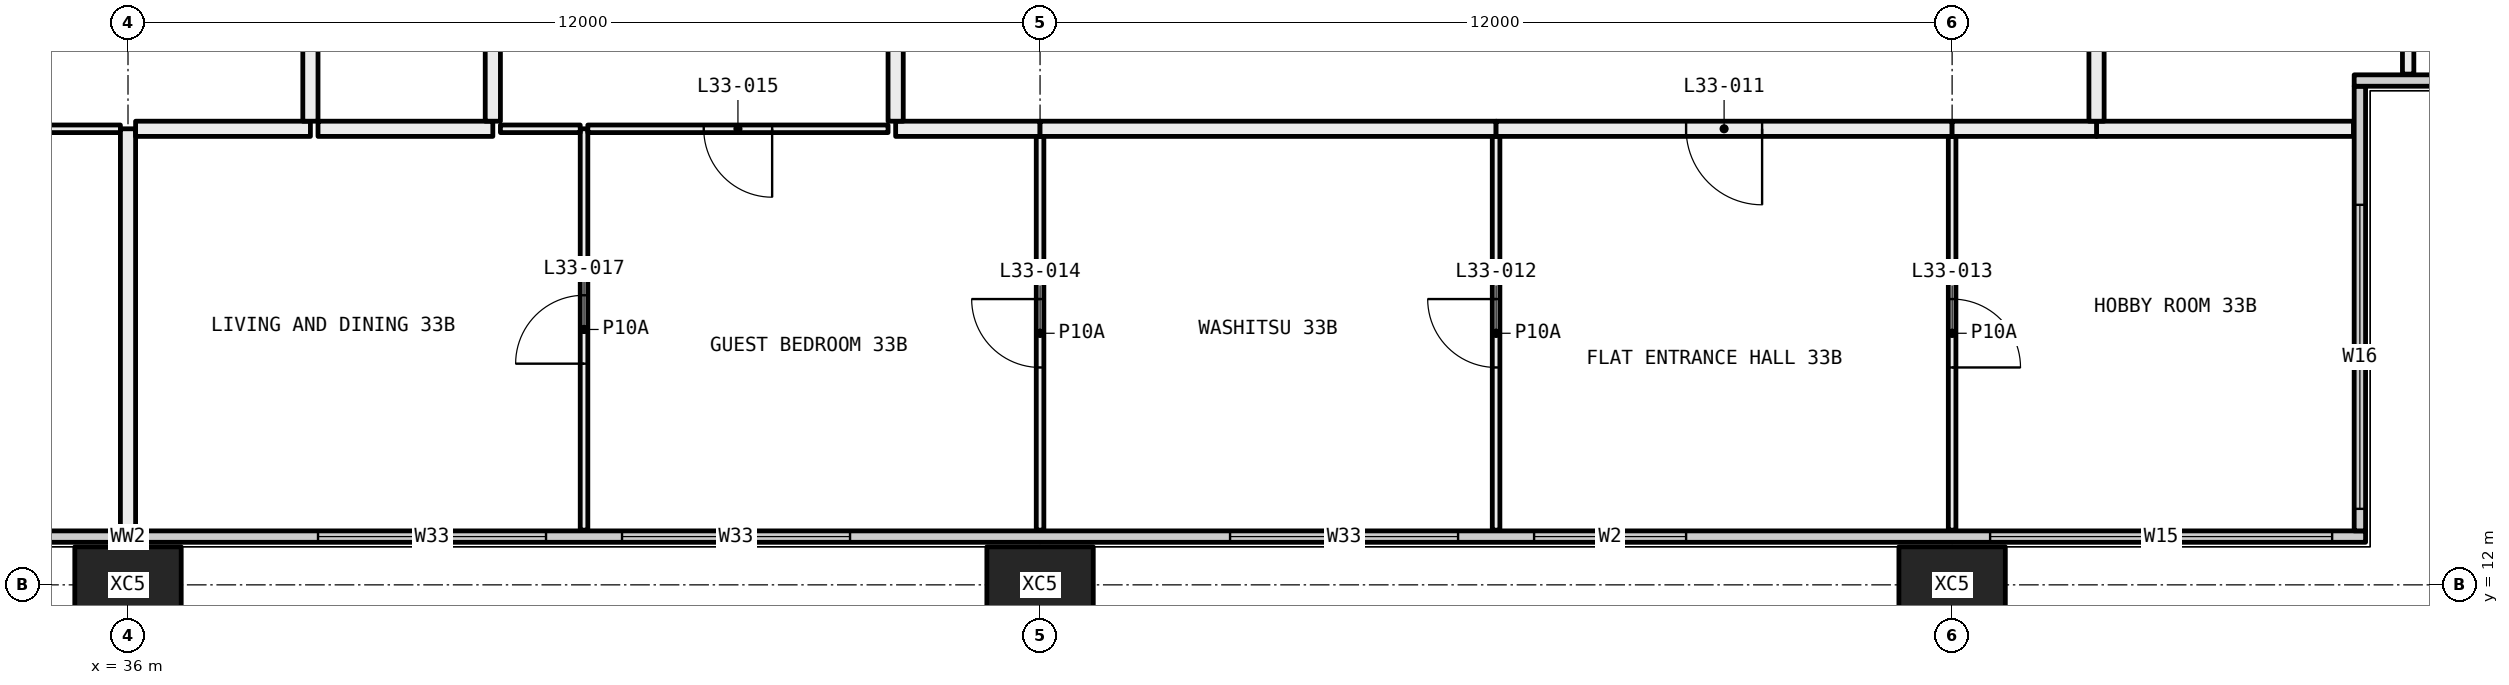
"""IFC4 building model, lengths in metres.
Left out: names, types, materials, properties, quantities, classifications, styles, units other than length and angle.
Written with IfcOpenShell. Run it as: python <this file> out.ifc"""

import sys

from ifc_helpers import new_model, si_unit, direction, frame, frame_2d, origin, origin_2d, place, context, subcontext, project, spatial, rectangle, hollow_rectangle, extrude, element, fill, save


model = new_model("IFC4")
c1 = context("Model", 3, precision=1e-05, world=origin(), true_north=direction((0.0, 1.0)))
c2 = subcontext(c1, "Body", "Model", "MODEL_VIEW")
j1 = project(units=[si_unit("LENGTHUNIT", "METRE"), si_unit("PLANEANGLEUNIT", "RADIAN")], contexts=[c1])
p1 = place(None, origin())
s1 = spatial("IfcSite", under=j1, at=p1, CompositionType="ELEMENT")
p2 = place(p1, origin())
s2 = spatial("IfcBuilding", under=s1, at=p2, CompositionType="ELEMENT")
p3 = place(p2, frame((0.0, 0.0, 127.65)))
s3 = spatial("IfcBuildingStorey", under=s2, at=p3, CompositionType="ELEMENT", Elevation=127.65)
for number, where, z_axis, x_axis in (
    (1, (36.0, 12.0, -0.4), (0.0, 0.0, 1.0), (1.0, 0.0, 0.0)),
    (2, (48.0, 12.0, -0.4), (0.0, 0.0, 1.0), (1.0, 0.0, 0.0)),
    (3, (60.0, 12.0, -0.4), (0.0, 0.0, 1.0), (1.0, 0.0, 0.0)),
):
    element("IfcColumn", number, at=place(p3, frame(where, z_axis=z_axis, x_axis=x_axis)), inside=s3, PredefinedType="COLUMN", context=c2, shape_type="SweptSolid", body=[
        extrude(hollow_rectangle(XDim=1.4, YDim=1.0, WallThickness=0.055, at=origin_2d()), origin(), (0.0, 0.0, 1.0), 3.45),
    ])
p4 = place(p3, frame((6.56, 12.635, 0.0), z_axis=(0.0, 0.0, 1.0), x_axis=(1.0, 0.0, 0.0)))
e4 = element("IfcWall", 4, at=p4, inside=s3, PredefinedType="ELEMENTEDWALL", context=c2, shape_type="SweptSolid", body=[
    extrude(rectangle(XDim=58.88, YDim=0.15, at=frame_2d((29.44, 0.0))), origin(), (0.0, 0.0, 1.0), 3.05),
])
p5 = place(p4, frame((0.44, 0.0, 0.45)))
e5 = element("IfcOpeningElement", 5, at=p5, cuts=e4, PredefinedType="OPENING", context=c2, shape_type="SweptSolid", body=[
    extrude(rectangle(XDim=4.5, YDim=2.55, at=frame_2d((2.25, 1.275))), frame((0.0, 0.085, 0.0), z_axis=(0.0, -1.0, 0.0), x_axis=(1.0, 0.0, 0.0)), (0.0, 0.0, 1.0), 0.17),
])
p6 = place(p4, frame((7.94, 0.0, 0.45)))
e6 = element("IfcOpeningElement", 6, at=p6, cuts=e4, PredefinedType="OPENING", context=c2, shape_type="SweptSolid", body=[
    extrude(rectangle(XDim=3.0, YDim=2.55, at=frame_2d((1.5, 1.275))), frame((0.0, 0.085, 0.0), z_axis=(0.0, -1.0, 0.0), x_axis=(1.0, 0.0, 0.0)), (0.0, 0.0, 1.0), 0.17),
])
p7 = place(p4, frame((11.94, 0.0, 0.45)))
e7 = element("IfcOpeningElement", 7, at=p7, cuts=e4, PredefinedType="OPENING", context=c2, shape_type="SweptSolid", body=[
    extrude(rectangle(XDim=3.0, YDim=2.55, at=frame_2d((1.5, 1.275))), frame((0.0, 0.085, 0.0), z_axis=(0.0, -1.0, 0.0), x_axis=(1.0, 0.0, 0.0)), (0.0, 0.0, 1.0), 0.17),
])
p8 = place(p4, frame((19.94, 0.0, 0.45)))
e8 = element("IfcOpeningElement", 8, at=p8, cuts=e4, PredefinedType="OPENING", context=c2, shape_type="SweptSolid", body=[
    extrude(rectangle(XDim=3.0, YDim=2.55, at=frame_2d((1.5, 1.275))), frame((0.0, 0.085, 0.0), z_axis=(0.0, -1.0, 0.0), x_axis=(1.0, 0.0, 0.0)), (0.0, 0.0, 1.0), 0.17),
])
p9 = place(p4, frame((23.94, 0.0, 0.45)))
e9 = element("IfcOpeningElement", 9, at=p9, cuts=e4, PredefinedType="OPENING", context=c2, shape_type="SweptSolid", body=[
    extrude(rectangle(XDim=2.0, YDim=2.55, at=frame_2d((1.0, 1.275))), frame((0.0, 0.085, 0.0), z_axis=(0.0, -1.0, 0.0), x_axis=(1.0, 0.0, 0.0)), (0.0, 0.0, 1.0), 0.17),
])
p10 = place(p4, frame((31.94, 0.0, 0.45)))
e10 = element("IfcOpeningElement", 10, at=p10, cuts=e4, PredefinedType="OPENING", context=c2, shape_type="SweptSolid", body=[
    extrude(rectangle(XDim=3.0, YDim=2.55, at=frame_2d((1.5, 1.275))), frame((0.0, 0.085, 0.0), z_axis=(0.0, -1.0, 0.0), x_axis=(1.0, 0.0, 0.0)), (0.0, 0.0, 1.0), 0.17),
])
p11 = place(p4, frame((35.94, 0.0, 0.45)))
e11 = element("IfcOpeningElement", 11, at=p11, cuts=e4, PredefinedType="OPENING", context=c2, shape_type="SweptSolid", body=[
    extrude(rectangle(XDim=3.0, YDim=2.55, at=frame_2d((1.5, 1.275))), frame((0.0, 0.085, 0.0), z_axis=(0.0, -1.0, 0.0), x_axis=(1.0, 0.0, 0.0)), (0.0, 0.0, 1.0), 0.17),
])
p12 = place(p4, frame((43.94, 0.0, 0.45)))
e12 = element("IfcOpeningElement", 12, at=p12, cuts=e4, PredefinedType="OPENING", context=c2, shape_type="SweptSolid", body=[
    extrude(rectangle(XDim=3.0, YDim=2.55, at=frame_2d((1.5, 1.275))), frame((0.0, 0.085, 0.0), z_axis=(0.0, -1.0, 0.0), x_axis=(1.0, 0.0, 0.0)), (0.0, 0.0, 1.0), 0.17),
])
p13 = place(p4, frame((47.94, 0.0, 0.45)))
e13 = element("IfcOpeningElement", 13, at=p13, cuts=e4, PredefinedType="OPENING", context=c2, shape_type="SweptSolid", body=[
    extrude(rectangle(XDim=2.0, YDim=2.55, at=frame_2d((1.0, 1.275))), frame((0.0, 0.085, 0.0), z_axis=(0.0, -1.0, 0.0), x_axis=(1.0, 0.0, 0.0)), (0.0, 0.0, 1.0), 0.17),
])
p14 = place(p4, frame((53.94, 0.0, 0.45)))
e14 = element("IfcOpeningElement", 14, at=p14, cuts=e4, PredefinedType="OPENING", context=c2, shape_type="SweptSolid", body=[
    extrude(rectangle(XDim=4.5, YDim=2.55, at=frame_2d((2.25, 1.275))), frame((0.0, 0.085, 0.0), z_axis=(0.0, -1.0, 0.0), x_axis=(1.0, 0.0, 0.0)), (0.0, 0.0, 1.0), 0.17),
])
p15 = place(p3, frame((65.365, 12.71, 0.0), z_axis=(0.0, 0.0, 1.0), x_axis=(0.0, 1.0, 0.0)))
e15 = element("IfcWall", 15, at=p15, inside=s3, PredefinedType="ELEMENTEDWALL", context=c2, shape_type="SweptSolid", body=[
    extrude(rectangle(XDim=5.85, YDim=0.15, at=frame_2d((2.925, 0.0))), origin(), (0.0, 0.0, 1.0), 3.05),
])
p16 = place(p15, frame((0.29, 0.0, 0.45)))
e16 = element("IfcOpeningElement", 16, at=p16, cuts=e15, PredefinedType="OPENING", context=c2, shape_type="SweptSolid", body=[
    extrude(rectangle(XDim=4.0, YDim=2.55, at=frame_2d((2.0, 1.275))), frame((0.0, 0.085, 0.0), z_axis=(0.0, -1.0, 0.0), x_axis=(1.0, 0.0, 0.0)), (0.0, 0.0, 1.0), 0.17),
])
p17 = place(p3, frame((65.29, 18.635, 0.0), z_axis=(0.0, 0.0, 1.0), x_axis=(1.0, 0.0, 0.0)))
e17 = element("IfcWall", 17, at=p17, inside=s3, PredefinedType="ELEMENTEDWALL", context=c2, shape_type="SweptSolid", body=[
    extrude(rectangle(XDim=6.15, YDim=0.15, at=frame_2d((3.075, 0.0))), origin(), (0.0, 0.0, 1.0), 3.05),
])
p18 = place(p17, frame((1.71, 0.0, 0.45)))
e18 = element("IfcOpeningElement", 18, at=p18, cuts=e17, PredefinedType="OPENING", context=c2, shape_type="SweptSolid", body=[
    extrude(rectangle(XDim=4.0, YDim=2.55, at=frame_2d((2.0, 1.275))), frame((0.0, 0.085, 0.0), z_axis=(0.0, -1.0, 0.0), x_axis=(1.0, 0.0, 0.0)), (0.0, 0.0, 1.0), 0.17),
])
p19 = place(p3, frame((35.9, 18.0, 0.0), z_axis=(0.0, 0.0, 1.0), x_axis=(-1.0, 0.0, 0.0)))
e19 = element("IfcWall", 19, at=p19, inside=s3, PredefinedType="PARTITIONING", context=c2, shape_type="SweptSolid", body=[
    extrude(rectangle(XDim=1.4, YDim=0.1, at=frame_2d((0.7, 0.0))), origin(), (0.0, 0.0, 1.0), 3.05),
])
p20 = place(p3, frame((36.0, 12.72, 0.0), z_axis=(0.0, 0.0, 1.0), x_axis=(0.0, 1.0, 0.0)))
e20 = element("IfcWall", 20, at=p20, inside=s3, PredefinedType="PARTITIONING", context=c2, shape_type="SweptSolid", body=[
    extrude(rectangle(XDim=5.28, YDim=0.2, at=frame_2d((2.64, 0.0))), origin(), (0.0, 0.0, 1.0), 2.45),
])
p21 = place(p3, frame((36.1, 18.0, 0.0), z_axis=(0.0, 0.0, 1.0), x_axis=(1.0, 0.0, 0.0)))
e21 = element("IfcWall", 21, at=p21, inside=s3, PredefinedType="PARTITIONING", context=c2, shape_type="SweptSolid", body=[
    extrude(rectangle(XDim=2.3, YDim=0.2, at=frame_2d((1.15, 0.0))), origin(), (0.0, 0.0, 1.0), 3.05),
])
p22 = place(p3, frame((38.4, 18.1, 0.0), z_axis=(0.0, 0.0, 1.0), x_axis=(0.0, 1.0, 0.0)))
e22 = element("IfcWall", 22, at=p22, inside=s3, PredefinedType="PARTITIONING", context=c2, shape_type="SweptSolid", body=[
    extrude(rectangle(XDim=6.2, YDim=0.2, at=frame_2d((3.1, 0.0))), origin(), (0.0, 0.0, 1.0), 2.45),
])
p23 = place(p3, frame((42.0, 12.72, 0.0), z_axis=(0.0, 0.0, 1.0), x_axis=(0.0, 1.0, 0.0)))
e23 = element("IfcWall", 23, at=p23, inside=s3, PredefinedType="PARTITIONING", context=c2, shape_type="SweptSolid", body=[
    extrude(rectangle(XDim=5.28, YDim=0.1, at=frame_2d((2.64, 0.0))), origin(), (0.0, 0.0, 1.0), 3.05),
])
p24 = place(p23, frame((2.19, 0.0, 0.0)))
e24 = element("IfcOpeningElement", 24, at=p24, cuts=e23, PredefinedType="OPENING", context=c2, shape_type="SweptSolid", body=[
    extrude(rectangle(XDim=0.9, YDim=2.1, at=frame_2d((0.45, 1.05))), frame((0.0, 0.06, 0.0), z_axis=(0.0, -1.0, 0.0), x_axis=(1.0, 0.0, 0.0)), (0.0, 0.0, 1.0), 0.12),
])
p25 = place(p3, frame((41.95, 18.0, 0.0), z_axis=(0.0, 0.0, 1.0), x_axis=(-1.0, 0.0, 0.0)))
e25 = element("IfcWall", 25, at=p25, inside=s3, PredefinedType="PARTITIONING", context=c2, shape_type="SweptSolid", body=[
    extrude(rectangle(XDim=1.05, YDim=0.1, at=frame_2d((0.525, 0.0))), origin(), (0.0, 0.0, 1.0), 3.05),
])
p26 = place(p3, frame((40.8, 18.0, 0.0), z_axis=(0.0, 0.0, 1.0), x_axis=(-1.0, 0.0, 0.0)))
e26 = element("IfcWall", 26, at=p26, inside=s3, PredefinedType="PARTITIONING", context=c2, shape_type="SweptSolid", body=[
    extrude(rectangle(XDim=2.3, YDim=0.2, at=frame_2d((1.15, 0.0))), origin(), (0.0, 0.0, 1.0), 3.05),
])
p27 = place(p3, frame((48.0, 12.72, 0.0), z_axis=(0.0, 0.0, 1.0), x_axis=(0.0, 1.0, 0.0)))
e27 = element("IfcWall", 27, at=p27, inside=s3, PredefinedType="PARTITIONING", context=c2, shape_type="SweptSolid", body=[
    extrude(rectangle(XDim=5.18, YDim=0.1, at=frame_2d((2.59, 0.0))), origin(), (0.0, 0.0, 1.0), 3.05),
])
p28 = place(p27, frame((2.14, 0.0, 0.0)))
e28 = element("IfcOpeningElement", 28, at=p28, cuts=e27, PredefinedType="OPENING", context=c2, shape_type="SweptSolid", body=[
    extrude(rectangle(XDim=0.9, YDim=2.1, at=frame_2d((0.45, 1.05))), frame((0.0, 0.06, 0.0), z_axis=(0.0, -1.0, 0.0), x_axis=(1.0, 0.0, 0.0)), (0.0, 0.0, 1.0), 0.12),
])
p29 = place(p3, frame((46.0, 18.0, 0.0), z_axis=(0.0, 0.0, 1.0), x_axis=(-1.0, 0.0, 0.0)))
e29 = element("IfcWall", 29, at=p29, inside=s3, PredefinedType="PARTITIONING", context=c2, shape_type="SweptSolid", body=[
    extrude(rectangle(XDim=3.95, YDim=0.1, at=frame_2d((1.975, 0.0))), origin(), (0.0, 0.0, 1.0), 3.05),
])
p30 = place(p29, frame((1.525, 0.0, 0.0)))
e30 = element("IfcOpeningElement", 30, at=p30, cuts=e29, PredefinedType="OPENING", context=c2, shape_type="SweptSolid", body=[
    extrude(rectangle(XDim=0.9, YDim=2.1, at=frame_2d((0.45, 1.05))), frame((0.0, 0.06, 0.0), z_axis=(0.0, -1.0, 0.0), x_axis=(1.0, 0.0, 0.0)), (0.0, 0.0, 1.0), 0.12),
])
p31 = place(p3, frame((48.0, 18.0, 0.0), z_axis=(0.0, 0.0, 1.0), x_axis=(-1.0, 0.0, 0.0)))
e31 = element("IfcWall", 31, at=p31, inside=s3, PredefinedType="PARTITIONING", context=c2, shape_type="SweptSolid", body=[
    extrude(rectangle(XDim=1.9, YDim=0.2, at=frame_2d((0.95, 0.0))), origin(), (0.0, 0.0, 1.0), 3.05),
])
p32 = place(p3, frame((54.0, 12.72, 0.0), z_axis=(0.0, 0.0, 1.0), x_axis=(0.0, 1.0, 0.0)))
e32 = element("IfcWall", 32, at=p32, inside=s3, PredefinedType="PARTITIONING", context=c2, shape_type="SweptSolid", body=[
    extrude(rectangle(XDim=5.18, YDim=0.1, at=frame_2d((2.59, 0.0))), origin(), (0.0, 0.0, 1.0), 3.05),
])
p33 = place(p32, frame((2.14, 0.0, 0.0)))
e33 = element("IfcOpeningElement", 33, at=p33, cuts=e32, PredefinedType="OPENING", context=c2, shape_type="SweptSolid", body=[
    extrude(rectangle(XDim=0.9, YDim=2.1, at=frame_2d((0.45, 1.05))), frame((0.0, 0.06, 0.0), z_axis=(0.0, -1.0, 0.0), x_axis=(1.0, 0.0, 0.0)), (0.0, 0.0, 1.0), 0.12),
])
p34 = place(p3, frame((54.0, 18.0, 0.0), z_axis=(0.0, 0.0, 1.0), x_axis=(-1.0, 0.0, 0.0)))
e34 = element("IfcWall", 34, at=p34, inside=s3, PredefinedType="PARTITIONING", context=c2, shape_type="SweptSolid", body=[
    extrude(rectangle(XDim=6.0, YDim=0.2, at=frame_2d((3.0, 0.0))), origin(), (0.0, 0.0, 1.0), 3.05),
])
p35 = place(p3, frame((60.0, 12.72, 0.0), z_axis=(0.0, 0.0, 1.0), x_axis=(0.0, 1.0, 0.0)))
e35 = element("IfcWall", 35, at=p35, inside=s3, PredefinedType="PARTITIONING", context=c2, shape_type="SweptSolid", body=[
    extrude(rectangle(XDim=5.18, YDim=0.1, at=frame_2d((2.59, 0.0))), origin(), (0.0, 0.0, 1.0), 3.05),
])
p36 = place(p35, frame((2.14, 0.0, 0.0)))
e36 = element("IfcOpeningElement", 36, at=p36, cuts=e35, PredefinedType="OPENING", context=c2, shape_type="SweptSolid", body=[
    extrude(rectangle(XDim=0.9, YDim=2.1, at=frame_2d((0.45, 1.05))), frame((0.0, 0.06, 0.0), z_axis=(0.0, -1.0, 0.0), x_axis=(1.0, 0.0, 0.0)), (0.0, 0.0, 1.0), 0.12),
])
p37 = place(p3, frame((60.0, 18.0, 0.0), z_axis=(0.0, 0.0, 1.0), x_axis=(-1.0, 0.0, 0.0)))
e37 = element("IfcWall", 37, at=p37, inside=s3, PredefinedType="PARTITIONING", context=c2, shape_type="SweptSolid", body=[
    extrude(rectangle(XDim=6.0, YDim=0.2, at=frame_2d((3.0, 0.0))), origin(), (0.0, 0.0, 1.0), 3.05),
])
p38 = place(p37, frame((2.5, 0.0, 0.0)))
e38 = element("IfcOpeningElement", 38, at=p38, cuts=e37, PredefinedType="OPENING", context=c2, shape_type="SweptSolid", body=[
    extrude(rectangle(XDim=1.0, YDim=2.1, at=frame_2d((0.5, 1.05))), frame((0.0, 0.11, 0.0), z_axis=(0.0, -1.0, 0.0), x_axis=(1.0, 0.0, 0.0)), (0.0, 0.0, 1.0), 0.22),
])
p39 = place(p3, frame((65.28, 18.0, 0.0), z_axis=(0.0, 0.0, 1.0), x_axis=(-1.0, 0.0, 0.0)))
e39 = element("IfcWall", 39, at=p39, inside=s3, PredefinedType="PARTITIONING", context=c2, shape_type="SweptSolid", body=[
    extrude(rectangle(XDim=3.38, YDim=0.2, at=frame_2d((1.69, 0.0))), origin(), (0.0, 0.0, 1.0), 3.05),
])
p40 = place(p3, frame((61.9, 18.0, 0.0), z_axis=(0.0, 0.0, 1.0), x_axis=(-1.0, 0.0, 0.0)))
e40 = element("IfcWall", 40, at=p40, inside=s3, PredefinedType="PARTITIONING", context=c2, shape_type="SweptSolid", body=[
    extrude(rectangle(XDim=1.9, YDim=0.2, at=frame_2d((0.95, 0.0))), origin(), (0.0, 0.0, 1.0), 3.05),
])
p41 = place(p3, frame((40.8, 23.9, 0.0), z_axis=(0.0, 0.0, 1.0), x_axis=(0.0, -1.0, 0.0)))
e41 = element("IfcWall", 41, at=p41, inside=s3, PredefinedType="PARTITIONING", context=c2, shape_type="SweptSolid", body=[
    extrude(rectangle(XDim=5.8, YDim=0.2, at=frame_2d((2.9, 0.0))), origin(), (0.0, 0.0, 1.0), 3.05),
])
p42 = place(p3, frame((46.1, 18.1, 0.0), z_axis=(0.0, 0.0, 1.0), x_axis=(0.0, 1.0, 0.0)))
e42 = element("IfcWall", 42, at=p42, inside=s3, PredefinedType="PARTITIONING", context=c2, shape_type="SweptSolid", body=[
    extrude(rectangle(XDim=6.2, YDim=0.2, at=frame_2d((3.1, 0.0))), origin(), (0.0, 0.0, 1.0), 2.45),
])
p43 = place(p3, frame((66.0, 21.0, 0.0), z_axis=(0.0, 0.0, 1.0), x_axis=(0.0, -1.0, 0.0)))
e43 = element("IfcWall", 43, at=p43, inside=s3, PredefinedType="PARTITIONING", context=c2, shape_type="SweptSolid", body=[
    extrude(rectangle(XDim=2.28, YDim=0.15, at=frame_2d((1.14, 0.0))), origin(), (0.0, 0.0, 1.0), 3.05),
])
p44 = place(p3, frame((61.9, 21.0, 0.0), z_axis=(0.0, 0.0, 1.0), x_axis=(0.0, -1.0, 0.0)))
e44 = element("IfcWall", 44, at=p44, inside=s3, PredefinedType="PARTITIONING", context=c2, shape_type="SweptSolid", body=[
    extrude(rectangle(XDim=2.9, YDim=0.2, at=frame_2d((1.45, 0.0))), origin(), (0.0, 0.0, 1.0), 3.05),
])
p45 = place(p10, origin())
e45 = element("IfcWindow", 45, at=p45, inside=s3, PartitioningType="SINGLE_PANEL", PredefinedType="WINDOW", context=c2, shape_type="SweptSolid", body=[
    extrude(rectangle(XDim=3.0, YDim=2.55, at=frame_2d((1.5, 1.275))), frame((0.0, 0.03, 0.0), z_axis=(0.0, -1.0, 0.0), x_axis=(1.0, 0.0, 0.0)), (0.0, 0.0, 1.0), 0.06),
])
fill(e10, e45)
p46 = place(p11, origin())
e46 = element("IfcWindow", 46, at=p46, inside=s3, PartitioningType="SINGLE_PANEL", PredefinedType="WINDOW", context=c2, shape_type="SweptSolid", body=[
    extrude(rectangle(XDim=3.0, YDim=2.55, at=frame_2d((1.5, 1.275))), frame((0.0, 0.03, 0.0), z_axis=(0.0, -1.0, 0.0), x_axis=(1.0, 0.0, 0.0)), (0.0, 0.0, 1.0), 0.06),
])
fill(e11, e46)
p47 = place(p12, origin())
e47 = element("IfcWindow", 47, at=p47, inside=s3, PartitioningType="SINGLE_PANEL", PredefinedType="WINDOW", context=c2, shape_type="SweptSolid", body=[
    extrude(rectangle(XDim=3.0, YDim=2.55, at=frame_2d((1.5, 1.275))), frame((0.0, 0.03, 0.0), z_axis=(0.0, -1.0, 0.0), x_axis=(1.0, 0.0, 0.0)), (0.0, 0.0, 1.0), 0.06),
])
fill(e12, e47)
p48 = place(p13, origin())
e48 = element("IfcWindow", 48, at=p48, inside=s3, PartitioningType="SINGLE_PANEL", PredefinedType="WINDOW", context=c2, shape_type="SweptSolid", body=[
    extrude(rectangle(XDim=2.0, YDim=2.55, at=frame_2d((1.0, 1.275))), frame((0.0, 0.03, 0.0), z_axis=(0.0, -1.0, 0.0), x_axis=(1.0, 0.0, 0.0)), (0.0, 0.0, 1.0), 0.06),
])
fill(e13, e48)
p49 = place(p14, origin())
e49 = element("IfcWindow", 49, at=p49, inside=s3, PartitioningType="SINGLE_PANEL", PredefinedType="WINDOW", context=c2, shape_type="SweptSolid", body=[
    extrude(rectangle(XDim=4.5, YDim=2.55, at=frame_2d((2.25, 1.275))), frame((0.0, 0.03, 0.0), z_axis=(0.0, -1.0, 0.0), x_axis=(1.0, 0.0, 0.0)), (0.0, 0.0, 1.0), 0.06),
])
fill(e14, e49)
p50 = place(p16, origin())
e50 = element("IfcWindow", 50, at=p50, inside=s3, PartitioningType="SINGLE_PANEL", PredefinedType="WINDOW", context=c2, shape_type="SweptSolid", body=[
    extrude(rectangle(XDim=4.0, YDim=2.55, at=frame_2d((2.0, 1.275))), frame((0.0, 0.03, 0.0), z_axis=(0.0, -1.0, 0.0), x_axis=(1.0, 0.0, 0.0)), (0.0, 0.0, 1.0), 0.06),
])
fill(e16, e50)
p51 = place(p38, origin())
e51 = element("IfcDoor", 51, at=p51, inside=s3, OperationType="SINGLE_SWING_RIGHT", PredefinedType="DOOR", context=c2, shape_type="SweptSolid", body=[
    extrude(rectangle(XDim=1.0, YDim=2.1, at=frame_2d((0.5, 1.05))), frame((0.0, 0.025, 0.0), z_axis=(0.0, -1.0, 0.0), x_axis=(1.0, 0.0, 0.0)), (0.0, 0.0, 1.0), 0.05),
])
fill(e38, e51)
p52 = place(p33, origin())
e52 = element("IfcDoor", 52, at=p52, inside=s3, OperationType="SINGLE_SWING_LEFT", PredefinedType="DOOR", context=c2, shape_type="SweptSolid", body=[
    extrude(rectangle(XDim=0.9, YDim=2.1, at=frame_2d((0.45, 1.05))), frame((0.0, 0.025, 0.0), z_axis=(0.0, -1.0, 0.0), x_axis=(1.0, 0.0, 0.0)), (0.0, 0.0, 1.0), 0.05),
])
fill(e33, e52)
p53 = place(p36, frame((0.9, 0.0, 0.0), x_axis=(-1.0, 0.0, 0.0)))
e53 = element("IfcDoor", 53, at=p53, inside=s3, OperationType="SINGLE_SWING_LEFT", PredefinedType="DOOR", context=c2, shape_type="SweptSolid", body=[
    extrude(rectangle(XDim=0.9, YDim=2.1, at=frame_2d((0.45, 1.05))), frame((0.0, 0.025, 0.0), z_axis=(0.0, -1.0, 0.0), x_axis=(1.0, 0.0, 0.0)), (0.0, 0.0, 1.0), 0.05),
])
fill(e36, e53)
p54 = place(p28, origin())
e54 = element("IfcDoor", 54, at=p54, inside=s3, OperationType="SINGLE_SWING_LEFT", PredefinedType="DOOR", context=c2, shape_type="SweptSolid", body=[
    extrude(rectangle(XDim=0.9, YDim=2.1, at=frame_2d((0.45, 1.05))), frame((0.0, 0.025, 0.0), z_axis=(0.0, -1.0, 0.0), x_axis=(1.0, 0.0, 0.0)), (0.0, 0.0, 1.0), 0.05),
])
fill(e28, e54)
p55 = place(p30, origin())
e55 = element("IfcDoor", 55, at=p55, inside=s3, OperationType="SINGLE_SWING_RIGHT", PredefinedType="DOOR", context=c2, shape_type="SweptSolid", body=[
    extrude(rectangle(XDim=0.9, YDim=2.1, at=frame_2d((0.45, 1.05))), frame((0.0, 0.025, 0.0), z_axis=(0.0, -1.0, 0.0), x_axis=(1.0, 0.0, 0.0)), (0.0, 0.0, 1.0), 0.05),
])
fill(e30, e55)
p56 = place(p24, origin())
e56 = element("IfcDoor", 56, at=p56, inside=s3, OperationType="SINGLE_SWING_RIGHT", PredefinedType="DOOR", context=c2, shape_type="SweptSolid", body=[
    extrude(rectangle(XDim=0.9, YDim=2.1, at=frame_2d((0.45, 1.05))), frame((0.0, 0.025, 0.0), z_axis=(0.0, -1.0, 0.0), x_axis=(1.0, 0.0, 0.0)), (0.0, 0.0, 1.0), 0.05),
])
fill(e24, e56)
save(model, sys.argv[1])
